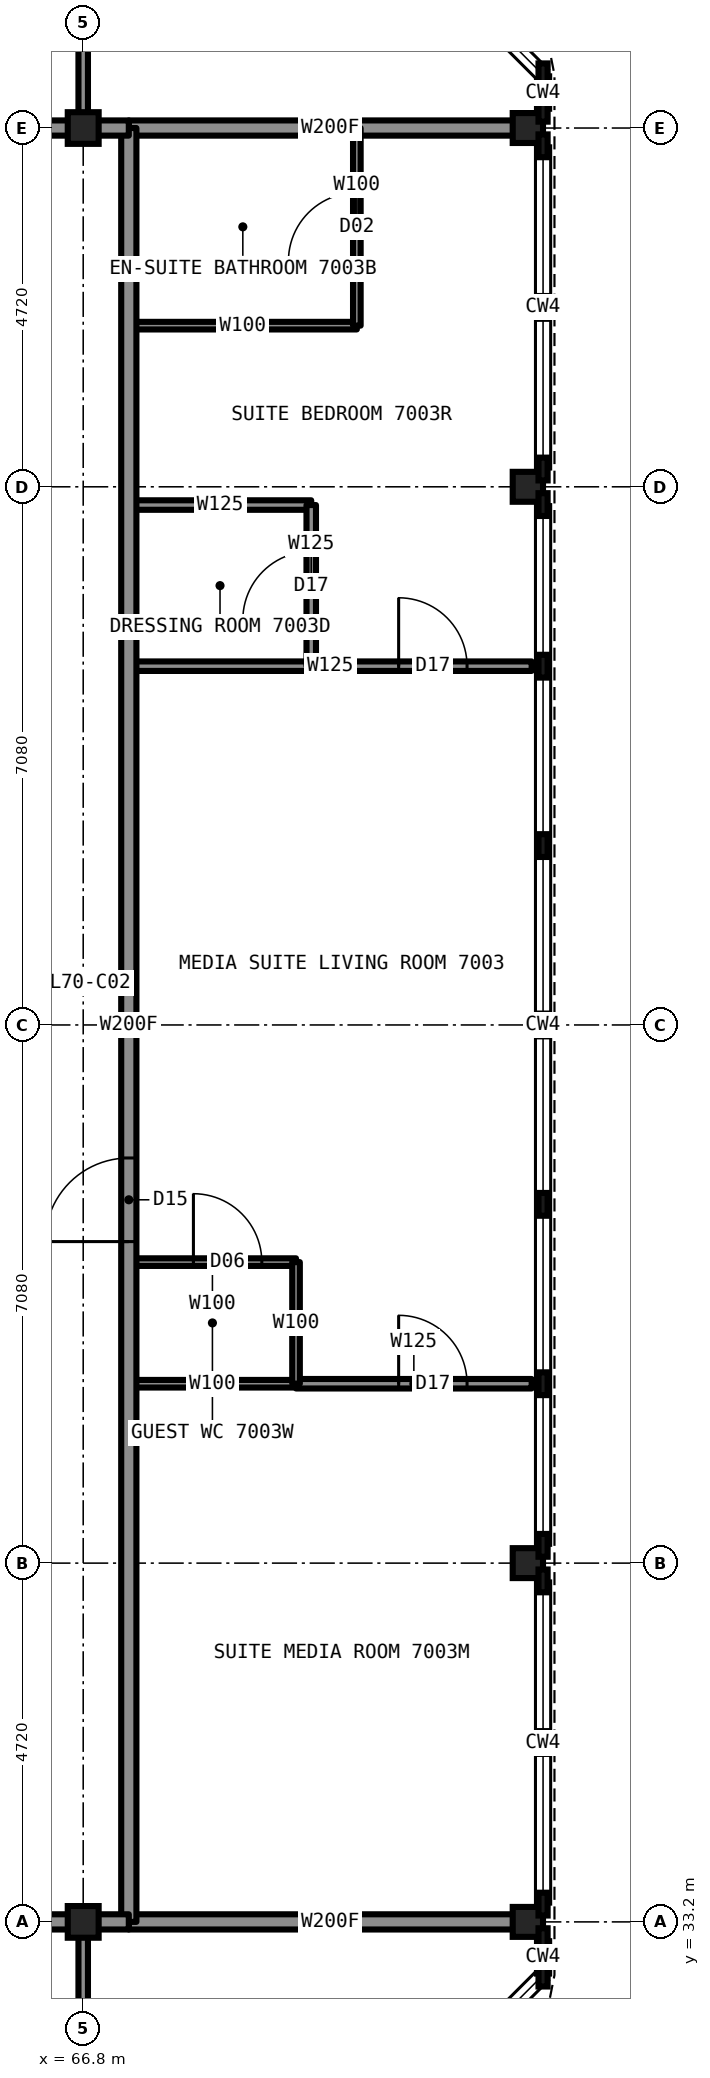
"""IFC4 building model, lengths in metres.
Left out: names, types, materials, properties, quantities, classifications, styles, units other than length and angle.
Written with IfcOpenShell. Run it as: python <this file> out.ifc"""

import sys

from ifc_helpers import new_model, si_unit, direction, frame, frame_2d, origin, origin_2d, place, context, subcontext, project, spatial, rectangle, i_section, extrude, element, fill, save


model = new_model("IFC4")
c1 = context("Model", 3, precision=1e-05, world=origin(), true_north=direction((0.0, 1.0)))
c2 = subcontext(c1, "Body", "Model", "MODEL_VIEW")
j1 = project(units=[si_unit("LENGTHUNIT", "METRE"), si_unit("PLANEANGLEUNIT", "RADIAN")], contexts=[c1])
p1 = place(None, origin())
s1 = spatial("IfcSite", under=j1, at=p1, CompositionType="ELEMENT")
p2 = place(p1, origin())
s2 = spatial("IfcBuilding", under=s1, at=p2, CompositionType="ELEMENT")
p3 = place(p2, frame((0.0, 0.0, 254.7)))
s3 = spatial("IfcBuildingStorey", under=s2, at=p3, CompositionType="ELEMENT", Elevation=254.7)
for number, where, z_axis, x_axis in (
    (1, (72.65, 33.2, 0.0), (0.0, 0.0, 1.0), (1.0, 0.0, 0.0)),
    (2, (72.65, 37.92, 0.0), (0.0, 0.0, 1.0), (1.0, 0.0, 0.0)),
    (3, (72.65, 52.08, 0.0), (0.0, 0.0, 1.0), (1.0, 0.0, 0.0)),
    (4, (72.65, 56.8, 0.0), (0.0, 0.0, 1.0), (1.0, 0.0, 0.0)),
):
    element("IfcColumn", number, at=place(p3, frame(where, z_axis=z_axis, x_axis=x_axis)), inside=s3, PredefinedType="COLUMN", context=c2, shape_type="SweptSolid", body=[
        extrude(i_section(OverallWidth=0.399, OverallDepth=0.394, WebThickness=0.023, FlangeThickness=0.037, at=origin_2d()), origin(), (0.0, 0.0, 1.0), 3.5),
    ])
for number, where, z_axis, x_axis in (
    (5, (66.8, 33.2, 0.0), (0.0, 0.0, 1.0), (1.0, 0.0, 0.0)),
    (6, (66.8, 56.8, 0.0), (0.0, 0.0, 1.0), (1.0, 0.0, 0.0)),
):
    element("IfcColumn", number, at=place(p3, frame(where, z_axis=z_axis, x_axis=x_axis)), inside=s3, PredefinedType="COLUMN", context=c2, shape_type="SweptSolid", body=[
        extrude(i_section(OverallWidth=0.406, OverallDepth=0.417, WebThickness=0.03, FlangeThickness=0.048, at=origin_2d()), origin(), (0.0, 0.0, 1.0), 3.5),
    ])
p4 = place(p3, frame((65.0, 33.2, 0.0), z_axis=(0.0, 0.0, 1.0), x_axis=(1.0, 0.0, 0.0)))
e7 = element("IfcWall", 7, at=p4, inside=s3, PredefinedType="PARTITIONING", context=c2, shape_type="SweptSolid", body=[
    extrude(rectangle(XDim=1.78, YDim=0.2, at=frame_2d((0.89, 0.0))), origin(), (0.0, 0.0, 1.0), 3.33),
])
p5 = place(p3, frame((67.4, 33.2, 0.0), z_axis=(0.0, 0.0, 1.0), x_axis=(1.0, 0.0, 0.0)))
e8 = element("IfcWall", 8, at=p5, inside=s3, PredefinedType="PARTITIONING", context=c2, shape_type="SweptSolid", body=[
    extrude(rectangle(XDim=5.3, YDim=0.2, at=frame_2d((2.65, 0.0))), origin(), (0.0, 0.0, 1.0), 2.573),
])
p6 = place(p3, frame((67.4, 41.88, 0.0), z_axis=(0.0, 0.0, 1.0), x_axis=(1.0, 0.0, 0.0)))
e9 = element("IfcWall", 9, at=p6, inside=s3, PredefinedType="PARTITIONING", context=c2, shape_type="SweptSolid", body=[
    extrude(rectangle(XDim=2.2, YDim=0.1, at=frame_2d((1.1, 0.0))), origin(), (0.0, 0.0, 1.0), 3.33),
])
p7 = place(p6, frame((0.85, 0.0, 0.0)))
e10 = element("IfcOpeningElement", 10, at=p7, cuts=e9, PredefinedType="OPENING", context=c2, shape_type="SweptSolid", body=[
    extrude(rectangle(XDim=0.9, YDim=2.1, at=frame_2d((0.45, 1.05))), frame((0.0, 0.06, 0.0), z_axis=(0.0, -1.0, 0.0), x_axis=(1.0, 0.0, 0.0)), (0.0, 0.0, 1.0), 0.12),
])
p8 = place(p3, frame((67.4, 40.28, 0.0), z_axis=(0.0, 0.0, 1.0), x_axis=(1.0, 0.0, 0.0)))
e11 = element("IfcWall", 11, at=p8, inside=s3, PredefinedType="PARTITIONING", context=c2, shape_type="SweptSolid", body=[
    extrude(rectangle(XDim=2.2, YDim=0.1, at=frame_2d((1.1, 0.0))), origin(), (0.0, 0.0, 1.0), 2.797),
])
p9 = place(p3, frame((69.6, 40.28, 0.0), z_axis=(0.0, 0.0, 1.0), x_axis=(1.0, 0.0, 0.0)))
e12 = element("IfcWall", 12, at=p9, inside=s3, PredefinedType="PARTITIONING", context=c2, shape_type="SweptSolid", body=[
    extrude(rectangle(XDim=3.1, YDim=0.125, at=frame_2d((1.55, 0.0))), origin(), (0.0, 0.0, 1.0), 2.797),
])
p10 = place(p9, frame((1.35, 0.0, 0.0)))
e13 = element("IfcOpeningElement", 13, at=p10, cuts=e12, PredefinedType="OPENING", context=c2, shape_type="SweptSolid", body=[
    extrude(rectangle(XDim=0.9, YDim=2.2, at=frame_2d((0.45, 1.1))), frame((0.0, 0.073, 0.0), z_axis=(0.0, -1.0, 0.0), x_axis=(1.0, 0.0, 0.0)), (0.0, 0.0, 1.0), 0.145),
])
p11 = place(p3, frame((65.0, 56.8, 0.0), z_axis=(0.0, 0.0, 1.0), x_axis=(1.0, 0.0, 0.0)))
e14 = element("IfcWall", 14, at=p11, inside=s3, PredefinedType="PARTITIONING", context=c2, shape_type="SweptSolid", body=[
    extrude(rectangle(XDim=1.78, YDim=0.2, at=frame_2d((0.89, 0.0))), origin(), (0.0, 0.0, 1.0), 3.33),
])
p12 = place(p3, frame((67.4, 56.8, 0.0), z_axis=(0.0, 0.0, 1.0), x_axis=(1.0, 0.0, 0.0)))
e15 = element("IfcWall", 15, at=p12, inside=s3, PredefinedType="PARTITIONING", context=c2, shape_type="SweptSolid", body=[
    extrude(rectangle(XDim=5.3, YDim=0.2, at=frame_2d((2.65, 0.0))), origin(), (0.0, 0.0, 1.0), 2.573),
])
p13 = place(p3, frame((67.4, 49.72, 0.0), z_axis=(0.0, 0.0, 1.0), x_axis=(1.0, 0.0, 0.0)))
e16 = element("IfcWall", 16, at=p13, inside=s3, PredefinedType="PARTITIONING", context=c2, shape_type="SweptSolid", body=[
    extrude(rectangle(XDim=5.3, YDim=0.125, at=frame_2d((2.65, 0.0))), origin(), (0.0, 0.0, 1.0), 2.797),
])
p14 = place(p13, frame((3.55, 0.0, 0.0)))
e17 = element("IfcOpeningElement", 17, at=p14, cuts=e16, PredefinedType="OPENING", context=c2, shape_type="SweptSolid", body=[
    extrude(rectangle(XDim=0.9, YDim=2.2, at=frame_2d((0.45, 1.1))), frame((0.0, 0.073, 0.0), z_axis=(0.0, -1.0, 0.0), x_axis=(1.0, 0.0, 0.0)), (0.0, 0.0, 1.0), 0.145),
])
p15 = place(p3, frame((67.4, 51.84, 0.0), z_axis=(0.0, 0.0, 1.0), x_axis=(1.0, 0.0, 0.0)))
e18 = element("IfcWall", 18, at=p15, inside=s3, PredefinedType="PARTITIONING", context=c2, shape_type="SweptSolid", body=[
    extrude(rectangle(XDim=2.4, YDim=0.125, at=frame_2d((1.2, 0.0))), origin(), (0.0, 0.0, 1.0), 3.33),
])
p16 = place(p3, frame((67.4, 54.2, 0.0), z_axis=(0.0, 0.0, 1.0), x_axis=(1.0, 0.0, 0.0)))
e19 = element("IfcWall", 19, at=p16, inside=s3, PredefinedType="PARTITIONING", context=c2, shape_type="SweptSolid", body=[
    extrude(rectangle(XDim=3.0, YDim=0.1, at=frame_2d((1.5, 0.0))), origin(), (0.0, 0.0, 1.0), 3.33),
])
p17 = place(p3, frame((66.8, 27.3, 0.0), z_axis=(0.0, 0.0, 1.0), x_axis=(0.0, 1.0, 0.0)))
e20 = element("IfcWall", 20, at=p17, inside=s3, PredefinedType="PARTITIONING", context=c2, shape_type="SweptSolid", body=[
    extrude(rectangle(XDim=5.9, YDim=0.125, at=frame_2d((2.95, 0.0))), origin(), (0.0, 0.0, 1.0), 2.573),
])
p18 = place(p17, frame((1.45, 0.0, 0.0)))
e21 = element("IfcOpeningElement", 21, at=p18, cuts=e20, PredefinedType="OPENING", context=c2, shape_type="SweptSolid", body=[
    extrude(rectangle(XDim=0.9, YDim=2.2, at=frame_2d((0.45, 1.1))), frame((0.0, 0.073, 0.0), z_axis=(0.0, -1.0, 0.0), x_axis=(1.0, 0.0, 0.0)), (0.0, 0.0, 1.0), 0.145),
])
p19 = place(p3, frame((66.8, 56.8, 0.0), z_axis=(0.0, 0.0, 1.0), x_axis=(0.0, 1.0, 0.0)))
e22 = element("IfcWall", 22, at=p19, inside=s3, PredefinedType="PARTITIONING", context=c2, shape_type="SweptSolid", body=[
    extrude(rectangle(XDim=5.9, YDim=0.125, at=frame_2d((2.95, 0.0))), origin(), (0.0, 0.0, 1.0), 2.573),
])
p20 = place(p19, frame((3.55, 0.0, 0.0)))
e23 = element("IfcOpeningElement", 23, at=p20, cuts=e22, PredefinedType="OPENING", context=c2, shape_type="SweptSolid", body=[
    extrude(rectangle(XDim=0.9, YDim=2.2, at=frame_2d((0.45, 1.1))), frame((0.0, 0.073, 0.0), z_axis=(0.0, -1.0, 0.0), x_axis=(1.0, 0.0, 0.0)), (0.0, 0.0, 1.0), 0.145),
])
p21 = place(p3, frame((67.4, 33.2, 0.0), z_axis=(0.0, 0.0, 1.0), x_axis=(0.0, 1.0, 0.0)))
e24 = element("IfcWall", 24, at=p21, inside=s3, PredefinedType="PARTITIONING", context=c2, shape_type="SweptSolid", body=[
    extrude(rectangle(XDim=23.6, YDim=0.2, at=frame_2d((11.8, 0.0))), origin(), (0.0, 0.0, 1.0), 3.33),
])
p22 = place(p21, frame((8.95, 0.0, 0.0)))
e25 = element("IfcOpeningElement", 25, at=p22, cuts=e24, PredefinedType="OPENING", context=c2, shape_type="SweptSolid", body=[
    extrude(rectangle(XDim=1.1, YDim=2.2, at=frame_2d((0.55, 1.1))), frame((0.0, 0.11, 0.0), z_axis=(0.0, -1.0, 0.0), x_axis=(1.0, 0.0, 0.0)), (0.0, 0.0, 1.0), 0.22),
])
p23 = place(p3, frame((69.6, 40.28, 0.0), z_axis=(0.0, 0.0, 1.0), x_axis=(0.0, 1.0, 0.0)))
e26 = element("IfcWall", 26, at=p23, inside=s3, PredefinedType="PARTITIONING", context=c2, shape_type="SweptSolid", body=[
    extrude(rectangle(XDim=1.6, YDim=0.1, at=frame_2d((0.8, 0.0))), origin(), (0.0, 0.0, 1.0), 3.33),
])
p24 = place(p3, frame((69.8, 49.72, 0.0), z_axis=(0.0, 0.0, 1.0), x_axis=(0.0, 1.0, 0.0)))
e27 = element("IfcWall", 27, at=p24, inside=s3, PredefinedType="PARTITIONING", context=c2, shape_type="SweptSolid", body=[
    extrude(rectangle(XDim=2.12, YDim=0.125, at=frame_2d((1.06, 0.0))), origin(), (0.0, 0.0, 1.0), 3.33),
])
p25 = place(p24, frame((0.61, 0.0, 0.0)))
e28 = element("IfcOpeningElement", 28, at=p25, cuts=e27, PredefinedType="OPENING", context=c2, shape_type="SweptSolid", body=[
    extrude(rectangle(XDim=0.9, YDim=2.2, at=frame_2d((0.45, 1.1))), frame((0.0, 0.073, 0.0), z_axis=(0.0, -1.0, 0.0), x_axis=(1.0, 0.0, 0.0)), (0.0, 0.0, 1.0), 0.145),
])
p26 = place(p3, frame((70.4, 54.2, 0.0), z_axis=(0.0, 0.0, 1.0), x_axis=(0.0, 1.0, 0.0)))
e29 = element("IfcWall", 29, at=p26, inside=s3, PredefinedType="PARTITIONING", context=c2, shape_type="SweptSolid", body=[
    extrude(rectangle(XDim=2.6, YDim=0.1, at=frame_2d((1.3, 0.0))), origin(), (0.0, 0.0, 1.0), 3.33),
])
p27 = place(p26, frame((0.85, 0.0, 0.0)))
e30 = element("IfcOpeningElement", 30, at=p27, cuts=e29, PredefinedType="OPENING", context=c2, shape_type="SweptSolid", body=[
    extrude(rectangle(XDim=0.9, YDim=2.1, at=frame_2d((0.45, 1.05))), frame((0.0, 0.06, 0.0), z_axis=(0.0, -1.0, 0.0), x_axis=(1.0, 0.0, 0.0)), (0.0, 0.0, 1.0), 0.12),
])
for number, where, z_axis, x_axis in (
    (31, (66.78, 33.2, 0.0), (0.0, 0.0, 1.0), (1.0, 0.0, 0.0)),
    (32, (66.78, 56.8, 0.0), (0.0, 0.0, 1.0), (1.0, 0.0, 0.0)),
):
    element("IfcWall", number, at=place(p3, frame(where, z_axis=z_axis, x_axis=x_axis)), inside=s3, PredefinedType="PARTITIONING", context=c2, shape_type="SweptSolid", body=[
        extrude(rectangle(XDim=0.62, YDim=0.2, at=frame_2d((0.31, 0.0))), origin(), (0.0, 0.0, 1.0), 2.573),
    ])
p28 = place(p22, origin())
e33 = element("IfcDoor", 33, at=p28, inside=s3, OperationType="SINGLE_SWING_LEFT", PredefinedType="DOOR", context=c2, shape_type="SweptSolid", body=[
    extrude(rectangle(XDim=1.1, YDim=2.2, at=frame_2d((0.55, 1.1))), frame((0.0, 0.025, 0.0), z_axis=(0.0, -1.0, 0.0), x_axis=(1.0, 0.0, 0.0)), (0.0, 0.0, 1.0), 0.05),
])
fill(e25, e33)
p29 = place(p27, origin())
e34 = element("IfcDoor", 34, at=p29, inside=s3, OperationType="SINGLE_SWING_RIGHT", PredefinedType="DOOR", context=c2, shape_type="SweptSolid", body=[
    extrude(rectangle(XDim=0.9, YDim=2.1, at=frame_2d((0.45, 1.05))), frame((0.0, 0.025, 0.0), z_axis=(0.0, -1.0, 0.0), x_axis=(1.0, 0.0, 0.0)), (0.0, 0.0, 1.0), 0.05),
])
fill(e30, e34)
p30 = place(p25, origin())
e35 = element("IfcDoor", 35, at=p30, inside=s3, OperationType="SINGLE_SWING_LEFT", PredefinedType="DOOR", context=c2, shape_type="SweptSolid", body=[
    extrude(rectangle(XDim=0.9, YDim=2.2, at=frame_2d((0.45, 1.1))), frame((0.0, 0.025, 0.0), z_axis=(0.0, -1.0, 0.0), x_axis=(1.0, 0.0, 0.0)), (0.0, 0.0, 1.0), 0.05),
])
fill(e28, e35)
p31 = place(p10, origin())
e36 = element("IfcDoor", 36, at=p31, inside=s3, OperationType="SINGLE_SWING_LEFT", PredefinedType="DOOR", context=c2, shape_type="SweptSolid", body=[
    extrude(rectangle(XDim=0.9, YDim=2.2, at=frame_2d((0.45, 1.1))), frame((0.0, 0.025, 0.0), z_axis=(0.0, -1.0, 0.0), x_axis=(1.0, 0.0, 0.0)), (0.0, 0.0, 1.0), 0.05),
])
fill(e13, e36)
p32 = place(p14, origin())
e37 = element("IfcDoor", 37, at=p32, inside=s3, OperationType="SINGLE_SWING_LEFT", PredefinedType="DOOR", context=c2, shape_type="SweptSolid", body=[
    extrude(rectangle(XDim=0.9, YDim=2.2, at=frame_2d((0.45, 1.1))), frame((0.0, 0.025, 0.0), z_axis=(0.0, -1.0, 0.0), x_axis=(1.0, 0.0, 0.0)), (0.0, 0.0, 1.0), 0.05),
])
fill(e17, e37)
p33 = place(p7, origin())
e38 = element("IfcDoor", 38, at=p33, inside=s3, OperationType="SINGLE_SWING_LEFT", PredefinedType="DOOR", context=c2, shape_type="SweptSolid", body=[
    extrude(rectangle(XDim=0.9, YDim=2.1, at=frame_2d((0.45, 1.05))), frame((0.0, 0.025, 0.0), z_axis=(0.0, -1.0, 0.0), x_axis=(1.0, 0.0, 0.0)), (0.0, 0.0, 1.0), 0.05),
])
fill(e10, e38)
save(model, sys.argv[1])
